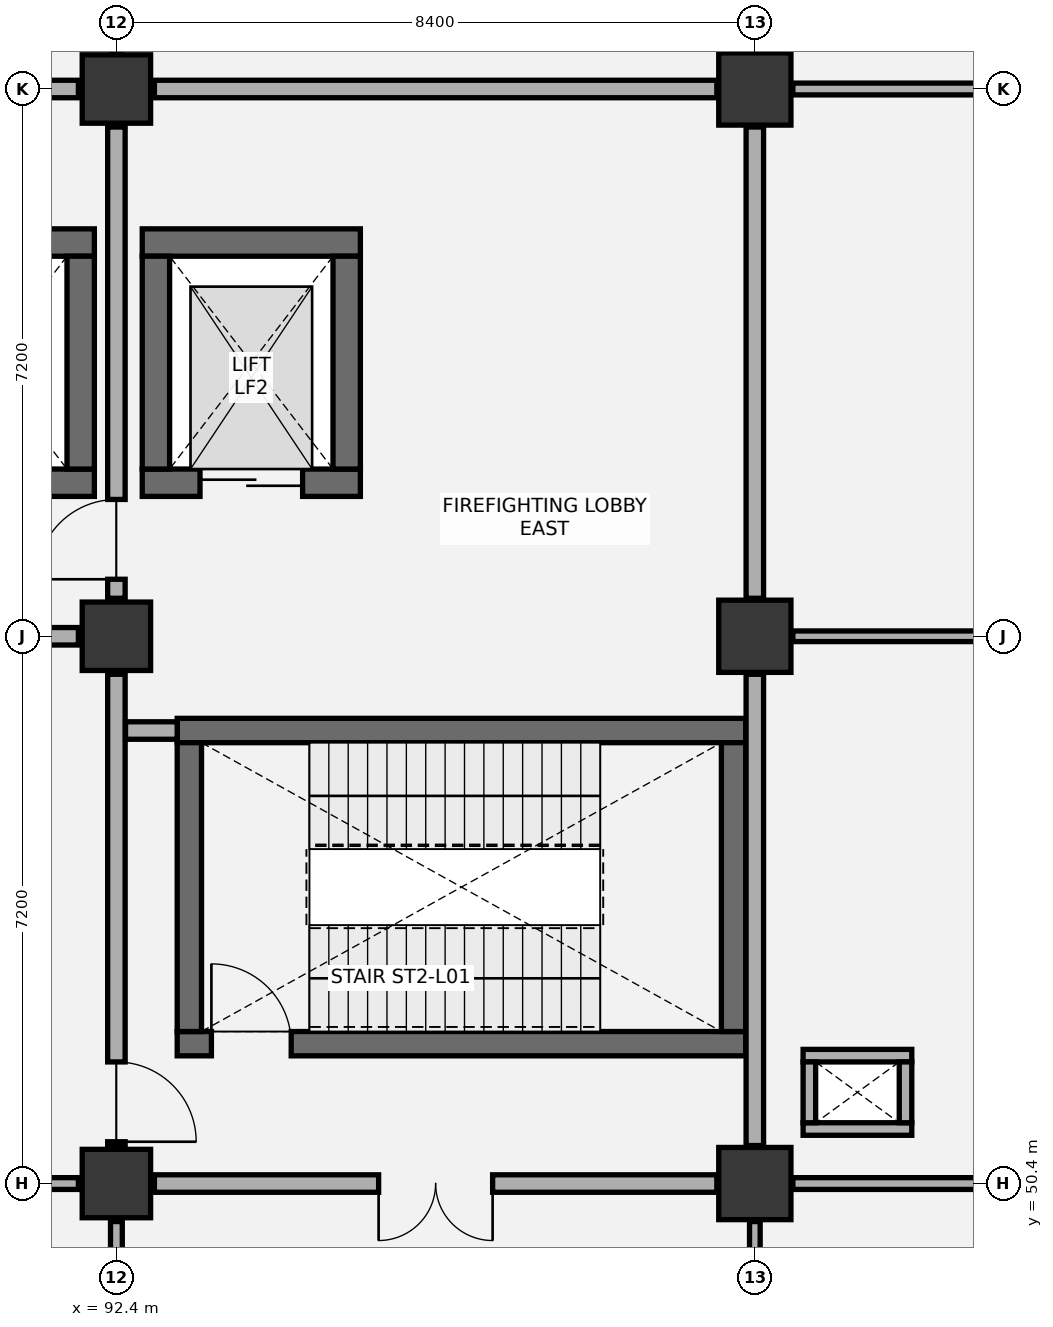
"""IFC4 building model, lengths in metres.
Left out: names, types, materials, properties, quantities, classifications, styles, units other than length and angle.
Written with IfcOpenShell. Run it as: python <this file> out.ifc"""

import sys

from ifc_helpers import new_model, si_unit, direction, frame, frame_2d, origin, origin_2d, place, context, subcontext, project, spatial, rectangle, extrude, element, fill, save


model = new_model("IFC4")
c1 = context("Model", 3, precision=1e-05, world=origin(), true_north=direction((0.0, 1.0)))
c2 = subcontext(c1, "Body", "Model", "MODEL_VIEW")
j1 = project(units=[si_unit("LENGTHUNIT", "METRE"), si_unit("PLANEANGLEUNIT", "RADIAN")], contexts=[c1])
p1 = place(None, origin())
s1 = spatial("IfcSite", under=j1, at=p1, CompositionType="ELEMENT")
p2 = place(p1, origin())
s2 = spatial("IfcBuilding", under=s1, at=p2, CompositionType="ELEMENT")
p3 = place(p2, frame((0.0, 0.0, 6.0)))
s3 = spatial("IfcBuildingStorey", under=s2, at=p3, CompositionType="ELEMENT", Elevation=6.0)
for number, where, z_axis, x_axis in (
    (1, (92.4, 50.4, 0.0), (0.0, 0.0, 1.0), (1.0, 0.0, 0.0)),
    (2, (92.4, 57.6, 0.0), (0.0, 0.0, 1.0), (1.0, 0.0, 0.0)),
    (3, (92.4, 64.8, 0.0), (0.0, 0.0, 1.0), (1.0, 0.0, 0.0)),
):
    element("IfcColumn", number, at=place(p3, frame(where, z_axis=z_axis, x_axis=x_axis)), inside=s3, PredefinedType="COLUMN", context=c2, shape_type="SweptSolid", body=[
        extrude(rectangle(XDim=0.9, YDim=0.9, at=origin_2d()), origin(), (0.0, 0.0, 1.0), 5.4),
    ])
for number, where, z_axis, x_axis in (
    (4, (100.8, 50.4, 0.0), (0.0, 0.0, 1.0), (1.0, 0.0, 0.0)),
    (5, (100.8, 57.6, 0.0), (0.0, 0.0, 1.0), (1.0, 0.0, 0.0)),
    (6, (100.8, 64.8, 0.0), (0.0, 0.0, 1.0), (1.0, 0.0, 0.0)),
):
    element("IfcColumn", number, at=place(p3, frame(where, z_axis=z_axis, x_axis=x_axis)), inside=s3, PredefinedType="COLUMN", context=c2, shape_type="SweptSolid", body=[
        extrude(rectangle(XDim=0.95, YDim=0.95, at=origin_2d()), origin(), (0.0, 0.0, 1.0), 5.4),
    ])
p4 = place(p3, frame((93.2, 52.24, 0.0), z_axis=(0.0, 0.0, 1.0), x_axis=(1.0, 0.0, 0.0)))
e7 = element("IfcWall", 7, at=p4, inside=s3, PredefinedType="SHEAR", context=c2, shape_type="SweptSolid", body=[
    extrude(rectangle(XDim=7.48, YDim=0.32, at=frame_2d((3.74, 0.0))), origin(), (0.0, 0.0, 1.0), 5.075),
])
p5 = place(p4, frame((0.45, 0.0, 0.0)))
e8 = element("IfcOpeningElement", 8, at=p5, cuts=e7, PredefinedType="OPENING", context=c2, shape_type="SweptSolid", body=[
    extrude(rectangle(XDim=1.05, YDim=2.15, at=frame_2d((0.525, 1.075))), frame((0.0, 0.17, 0.0), z_axis=(0.0, -1.0, 0.0), x_axis=(1.0, 0.0, 0.0)), (0.0, 0.0, 1.0), 0.34),
])
p6 = place(p3, frame((93.2, 56.36, 0.0), z_axis=(0.0, 0.0, 1.0), x_axis=(1.0, 0.0, 0.0)))
e9 = element("IfcWall", 9, at=p6, inside=s3, PredefinedType="SHEAR", context=c2, shape_type="SweptSolid", body=[
    extrude(rectangle(XDim=7.48, YDim=0.32, at=frame_2d((3.74, 0.0))), origin(), (0.0, 0.0, 1.0), 5.075),
])
for number, where, z_axis, x_axis in (
    (10, (93.36, 52.4, 0.0), (0.0, 0.0, 1.0), (0.0, 1.0, 0.0)),
    (11, (100.52, 52.4, 0.0), (0.0, 0.0, 1.0), (0.0, 1.0, 0.0)),
):
    element("IfcWall", number, at=place(p3, frame(where, z_axis=z_axis, x_axis=x_axis)), inside=s3, PredefinedType="SHEAR", context=c2, shape_type="SweptSolid", body=[
        extrude(rectangle(XDim=3.8, YDim=0.32, at=frame_2d((1.9, 0.0))), origin(), (0.0, 0.0, 1.0), 5.075),
    ])
p7 = place(p3, frame((84.34, 62.78, 0.0), z_axis=(0.0, 0.0, 1.0), x_axis=(1.0, 0.0, 0.0)))
e12 = element("IfcWall", 12, at=p7, inside=s3, PredefinedType="SHEAR", context=c2, shape_type="SweptSolid", body=[
    extrude(rectangle(XDim=7.77, YDim=0.36, at=frame_2d((3.885, 0.0))), origin(), (0.0, 0.0, 1.0), 5.075),
])
p8 = place(p3, frame((89.45, 59.62, 0.0), z_axis=(0.0, 0.0, 1.0), x_axis=(1.0, 0.0, 0.0)))
e13 = element("IfcWall", 13, at=p8, inside=s3, PredefinedType="SHEAR", context=c2, shape_type="SweptSolid", body=[
    extrude(rectangle(XDim=2.66, YDim=0.36, at=frame_2d((1.33, 0.0))), origin(), (0.0, 0.0, 1.0), 5.075),
])
p9 = place(p8, frame((0.78, 0.0, 0.0)))
e14 = element("IfcOpeningElement", 14, at=p9, cuts=e13, PredefinedType="OPENING", context=c2, shape_type="SweptSolid", body=[
    extrude(rectangle(XDim=1.1, YDim=2.15, at=frame_2d((0.55, 1.075))), frame((0.0, 0.19, 0.0), z_axis=(0.0, -1.0, 0.0), x_axis=(1.0, 0.0, 0.0)), (0.0, 0.0, 1.0), 0.38),
])
p10 = place(p3, frame((91.93, 59.8, 0.0), z_axis=(0.0, 0.0, 1.0), x_axis=(0.0, 1.0, 0.0)))
e15 = element("IfcWall", 15, at=p10, inside=s3, PredefinedType="SHEAR", context=c2, shape_type="SweptSolid", body=[
    extrude(rectangle(XDim=2.8, YDim=0.36, at=frame_2d((1.4, 0.0))), origin(), (0.0, 0.0, 1.0), 5.075),
])
p11 = place(p3, frame((92.74, 62.78, 0.0), z_axis=(0.0, 0.0, 1.0), x_axis=(1.0, 0.0, 0.0)))
e16 = element("IfcWall", 16, at=p11, inside=s3, PredefinedType="SHEAR", context=c2, shape_type="SweptSolid", body=[
    extrude(rectangle(XDim=2.87, YDim=0.36, at=frame_2d((1.435, 0.0))), origin(), (0.0, 0.0, 1.0), 5.075),
])
p12 = place(p3, frame((92.74, 59.62, 0.0), z_axis=(0.0, 0.0, 1.0), x_axis=(1.0, 0.0, 0.0)))
e17 = element("IfcWall", 17, at=p12, inside=s3, PredefinedType="SHEAR", context=c2, shape_type="SweptSolid", body=[
    extrude(rectangle(XDim=2.87, YDim=0.36, at=frame_2d((1.435, 0.0))), origin(), (0.0, 0.0, 1.0), 5.075),
])
p13 = place(p12, frame((0.76, 0.0, 0.0)))
e18 = element("IfcOpeningElement", 18, at=p13, cuts=e17, PredefinedType="OPENING", context=c2, shape_type="SweptSolid", body=[
    extrude(rectangle(XDim=1.35, YDim=2.2, at=frame_2d((0.675, 1.1))), frame((0.0, 0.19, 0.0), z_axis=(0.0, -1.0, 0.0), x_axis=(1.0, 0.0, 0.0)), (0.0, 0.0, 1.0), 0.38),
])
for number, where, z_axis, x_axis in (
    (19, (92.92, 59.8, 0.0), (0.0, 0.0, 1.0), (0.0, 1.0, 0.0)),
    (20, (95.43, 59.8, 0.0), (0.0, 0.0, 1.0), (0.0, 1.0, 0.0)),
):
    element("IfcWall", number, at=place(p3, frame(where, z_axis=z_axis, x_axis=x_axis)), inside=s3, PredefinedType="SHEAR", context=c2, shape_type="SweptSolid", body=[
        extrude(rectangle(XDim=2.8, YDim=0.36, at=frame_2d((1.4, 0.0))), origin(), (0.0, 0.0, 1.0), 5.075),
    ])
for number, where, z_axis, x_axis in (
    (21, (101.435, 51.117, 0.0), (0.0, 0.0, 1.0), (1.0, 0.0, 0.0)),
    (22, (101.435, 52.083, 0.0), (0.0, 0.0, 1.0), (1.0, 0.0, 0.0)),
):
    element("IfcWall", number, at=place(p3, frame(where, z_axis=z_axis, x_axis=x_axis)), inside=s3, PredefinedType="PARTITIONING", context=c2, shape_type="SweptSolid", body=[
        extrude(rectangle(XDim=1.43, YDim=0.165, at=frame_2d((0.715, 0.0))), origin(), (0.0, 0.0, 1.0), 5.075),
    ])
for number, where, z_axis, x_axis in (
    (23, (101.518, 51.2, 0.0), (0.0, 0.0, 1.0), (0.0, 1.0, 0.0)),
    (24, (102.782, 51.2, 0.0), (0.0, 0.0, 1.0), (0.0, 1.0, 0.0)),
):
    element("IfcWall", number, at=place(p3, frame(where, z_axis=z_axis, x_axis=x_axis)), inside=s3, PredefinedType="PARTITIONING", context=c2, shape_type="SweptSolid", body=[
        extrude(rectangle(XDim=0.8, YDim=0.165, at=frame_2d((0.4, 0.0))), origin(), (0.0, 0.0, 1.0), 5.075),
    ])
p14 = place(p3, frame((92.4, 43.7, 0.0), z_axis=(0.0, 0.0, 1.0), x_axis=(0.0, 1.0, 0.0)))
e25 = element("IfcWall", 25, at=p14, inside=s3, PredefinedType="PARTITIONING", context=c2, shape_type="SweptSolid", body=[
    extrude(rectangle(XDim=6.2, YDim=0.155, at=frame_2d((3.1, 0.0))), origin(), (0.0, 0.0, 1.0), 4.67),
])
p15 = place(p14, frame((2.25, 0.0, 0.0)))
e26 = element("IfcOpeningElement", 26, at=p15, cuts=e25, PredefinedType="OPENING", context=c2, shape_type="SweptSolid", body=[
    extrude(rectangle(XDim=1.7, YDim=2.25, at=frame_2d((0.85, 1.125))), frame((0.0, 0.087, 0.0), z_axis=(0.0, -1.0, 0.0), x_axis=(1.0, 0.0, 0.0)), (0.0, 0.0, 1.0), 0.175),
])
p16 = place(p3, frame((84.5, 50.4, 0.0), z_axis=(0.0, 0.0, 1.0), x_axis=(1.0, 0.0, 0.0)))
e27 = element("IfcWall", 27, at=p16, inside=s3, PredefinedType="PARTITIONING", context=c2, shape_type="SweptSolid", body=[
    extrude(rectangle(XDim=7.4, YDim=0.155, at=frame_2d((3.7, 0.0))), origin(), (0.0, 0.0, 1.0), 4.27),
])
p17 = place(p16, frame((3.0, 0.0, 0.0)))
e28 = element("IfcOpeningElement", 28, at=p17, cuts=e27, PredefinedType="OPENING", context=c2, shape_type="SweptSolid", body=[
    extrude(rectangle(XDim=1.4, YDim=2.15, at=frame_2d((0.7, 1.075))), frame((0.0, 0.087, 0.0), z_axis=(0.0, -1.0, 0.0), x_axis=(1.0, 0.0, 0.0)), (0.0, 0.0, 1.0), 0.175),
])
p18 = place(p3, frame((92.4, 50.9, 0.0), z_axis=(0.0, 0.0, 1.0), x_axis=(0.0, 1.0, 0.0)))
e29 = element("IfcWall", 29, at=p18, inside=s3, PredefinedType="PARTITIONING", context=c2, shape_type="SweptSolid", body=[
    extrude(rectangle(XDim=6.2, YDim=0.23, at=frame_2d((3.1, 0.0))), origin(), (0.0, 0.0, 1.0), 4.32),
])
p19 = place(p18, frame((0.05, 0.0, 0.0)))
e30 = element("IfcOpeningElement", 30, at=p19, cuts=e29, PredefinedType="OPENING", context=c2, shape_type="SweptSolid", body=[
    extrude(rectangle(XDim=1.05, YDim=2.15, at=frame_2d((0.525, 1.075))), frame((0.0, 0.125, 0.0), z_axis=(0.0, -1.0, 0.0), x_axis=(1.0, 0.0, 0.0)), (0.0, 0.0, 1.0), 0.25),
])
p20 = place(p3, frame((84.5, 57.6, 0.0), z_axis=(0.0, 0.0, 1.0), x_axis=(1.0, 0.0, 0.0)))
e31 = element("IfcWall", 31, at=p20, inside=s3, PredefinedType="PARTITIONING", context=c2, shape_type="SweptSolid", body=[
    extrude(rectangle(XDim=7.4, YDim=0.23, at=frame_2d((3.7, 0.0))), origin(), (0.0, 0.0, 1.0), 4.27),
])
p21 = place(p20, frame((2.95, 0.0, 0.0)))
e32 = element("IfcOpeningElement", 32, at=p21, cuts=e31, PredefinedType="OPENING", context=c2, shape_type="SweptSolid", body=[
    extrude(rectangle(XDim=1.5, YDim=2.15, at=frame_2d((0.75, 1.075))), frame((0.0, 0.125, 0.0), z_axis=(0.0, -1.0, 0.0), x_axis=(1.0, 0.0, 0.0)), (0.0, 0.0, 1.0), 0.25),
])
p22 = place(p3, frame((92.4, 58.1, 0.0), z_axis=(0.0, 0.0, 1.0), x_axis=(0.0, 1.0, 0.0)))
e33 = element("IfcWall", 33, at=p22, inside=s3, PredefinedType="PARTITIONING", context=c2, shape_type="SweptSolid", body=[
    extrude(rectangle(XDim=6.2, YDim=0.23, at=frame_2d((3.1, 0.0))), origin(), (0.0, 0.0, 1.0), 4.78),
])
p23 = place(p22, frame((0.25, 0.0, 0.0)))
e34 = element("IfcOpeningElement", 34, at=p23, cuts=e33, PredefinedType="OPENING", context=c2, shape_type="SweptSolid", body=[
    extrude(rectangle(XDim=1.05, YDim=2.15, at=frame_2d((0.525, 1.075))), frame((0.0, 0.125, 0.0), z_axis=(0.0, -1.0, 0.0), x_axis=(1.0, 0.0, 0.0)), (0.0, 0.0, 1.0), 0.25),
])
p24 = place(p3, frame((84.5, 64.8, 0.0), z_axis=(0.0, 0.0, 1.0), x_axis=(1.0, 0.0, 0.0)))
e35 = element("IfcWall", 35, at=p24, inside=s3, PredefinedType="PARTITIONING", context=c2, shape_type="SweptSolid", body=[
    extrude(rectangle(XDim=7.4, YDim=0.23, at=frame_2d((3.7, 0.0))), origin(), (0.0, 0.0, 1.0), 4.27),
])
p25 = place(p3, frame((100.8, 43.7, 0.0), z_axis=(0.0, 0.0, 1.0), x_axis=(0.0, 1.0, 0.0)))
e36 = element("IfcWall", 36, at=p25, inside=s3, PredefinedType="PARTITIONING", context=c2, shape_type="SweptSolid", body=[
    extrude(rectangle(XDim=6.2, YDim=0.14, at=frame_2d((3.1, 0.0))), origin(), (0.0, 0.0, 1.0), 4.32),
])
p26 = place(p25, frame((2.4, 0.0, 0.0)))
e37 = element("IfcOpeningElement", 37, at=p26, cuts=e36, PredefinedType="OPENING", context=c2, shape_type="SweptSolid", body=[
    extrude(rectangle(XDim=1.4, YDim=2.15, at=frame_2d((0.7, 1.075))), frame((0.0, 0.08, 0.0), z_axis=(0.0, -1.0, 0.0), x_axis=(1.0, 0.0, 0.0)), (0.0, 0.0, 1.0), 0.16),
])
p27 = place(p3, frame((92.9, 50.4, 0.0), z_axis=(0.0, 0.0, 1.0), x_axis=(1.0, 0.0, 0.0)))
e38 = element("IfcWall", 38, at=p27, inside=s3, PredefinedType="PARTITIONING", context=c2, shape_type="SweptSolid", body=[
    extrude(rectangle(XDim=7.4, YDim=0.23, at=frame_2d((3.7, 0.0))), origin(), (0.0, 0.0, 1.0), 4.27),
])
p28 = place(p27, frame((2.95, 0.0, 0.0)))
e39 = element("IfcOpeningElement", 39, at=p28, cuts=e38, PredefinedType="OPENING", context=c2, shape_type="SweptSolid", body=[
    extrude(rectangle(XDim=1.5, YDim=2.15, at=frame_2d((0.75, 1.075))), frame((0.0, 0.125, 0.0), z_axis=(0.0, -1.0, 0.0), x_axis=(1.0, 0.0, 0.0)), (0.0, 0.0, 1.0), 0.25),
])
p29 = place(p3, frame((100.8, 50.9, 0.0), z_axis=(0.0, 0.0, 1.0), x_axis=(0.0, 1.0, 0.0)))
e40 = element("IfcWall", 40, at=p29, inside=s3, PredefinedType="PARTITIONING", context=c2, shape_type="SweptSolid", body=[
    extrude(rectangle(XDim=6.2, YDim=0.23, at=frame_2d((3.1, 0.0))), origin(), (0.0, 0.0, 1.0), 4.78),
])
p30 = place(p3, frame((92.52, 56.36, 0.0), z_axis=(0.0, 0.0, 1.0), x_axis=(1.0, 0.0, 0.0)))
e41 = element("IfcWall", 41, at=p30, inside=s3, PredefinedType="PARTITIONING", context=c2, shape_type="SweptSolid", body=[
    extrude(rectangle(XDim=0.68, YDim=0.23, at=frame_2d((0.34, 0.0))), origin(), (0.0, 0.0, 1.0), 5.075),
])
p31 = place(p3, frame((100.8, 58.1, 0.0), z_axis=(0.0, 0.0, 1.0), x_axis=(0.0, 1.0, 0.0)))
e42 = element("IfcWall", 42, at=p31, inside=s3, PredefinedType="PARTITIONING", context=c2, shape_type="SweptSolid", body=[
    extrude(rectangle(XDim=6.2, YDim=0.23, at=frame_2d((3.1, 0.0))), origin(), (0.0, 0.0, 1.0), 4.32),
])
p32 = place(p3, frame((92.9, 64.8, 0.0), z_axis=(0.0, 0.0, 1.0), x_axis=(1.0, 0.0, 0.0)))
e43 = element("IfcWall", 43, at=p32, inside=s3, PredefinedType="PARTITIONING", context=c2, shape_type="SweptSolid", body=[
    extrude(rectangle(XDim=7.4, YDim=0.23, at=frame_2d((3.7, 0.0))), origin(), (0.0, 0.0, 1.0), 4.27),
])
p33 = place(p3, frame((101.3, 50.4, 0.0), z_axis=(0.0, 0.0, 1.0), x_axis=(1.0, 0.0, 0.0)))
e44 = element("IfcWall", 44, at=p33, inside=s3, PredefinedType="PARTITIONING", context=c2, shape_type="SweptSolid", body=[
    extrude(rectangle(XDim=7.4, YDim=0.155, at=frame_2d((3.7, 0.0))), origin(), (0.0, 0.0, 1.0), 4.27),
])
p34 = place(p33, frame((3.0, 0.0, 0.0)))
e45 = element("IfcOpeningElement", 45, at=p34, cuts=e44, PredefinedType="OPENING", context=c2, shape_type="SweptSolid", body=[
    extrude(rectangle(XDim=1.4, YDim=2.15, at=frame_2d((0.7, 1.075))), frame((0.0, 0.087, 0.0), z_axis=(0.0, -1.0, 0.0), x_axis=(1.0, 0.0, 0.0)), (0.0, 0.0, 1.0), 0.175),
])
p35 = place(p3, frame((101.3, 57.6, 0.0), z_axis=(0.0, 0.0, 1.0), x_axis=(1.0, 0.0, 0.0)))
e46 = element("IfcWall", 46, at=p35, inside=s3, PredefinedType="PARTITIONING", context=c2, shape_type="SweptSolid", body=[
    extrude(rectangle(XDim=7.4, YDim=0.14, at=frame_2d((3.7, 0.0))), origin(), (0.0, 0.0, 1.0), 4.27),
])
p36 = place(p35, frame((2.85, 0.0, 0.0)))
e47 = element("IfcOpeningElement", 47, at=p36, cuts=e46, PredefinedType="OPENING", context=c2, shape_type="SweptSolid", body=[
    extrude(rectangle(XDim=1.7, YDim=2.25, at=frame_2d((0.85, 1.125))), frame((0.0, 0.08, 0.0), z_axis=(0.0, -1.0, 0.0), x_axis=(1.0, 0.0, 0.0)), (0.0, 0.0, 1.0), 0.16),
])
p37 = place(p3, frame((101.3, 64.8, 0.0), z_axis=(0.0, 0.0, 1.0), x_axis=(1.0, 0.0, 0.0)))
e48 = element("IfcWall", 48, at=p37, inside=s3, PredefinedType="PARTITIONING", context=c2, shape_type="SweptSolid", body=[
    extrude(rectangle(XDim=7.4, YDim=0.155, at=frame_2d((3.7, 0.0))), origin(), (0.0, 0.0, 1.0), 4.27),
])
p38 = place(p37, frame((2.85, 0.0, 0.0)))
e49 = element("IfcOpeningElement", 49, at=p38, cuts=e48, PredefinedType="OPENING", context=c2, shape_type="SweptSolid", body=[
    extrude(rectangle(XDim=1.7, YDim=2.25, at=frame_2d((0.85, 1.125))), frame((0.0, 0.087, 0.0), z_axis=(0.0, -1.0, 0.0), x_axis=(1.0, 0.0, 0.0)), (0.0, 0.0, 1.0), 0.175),
])
p39 = place(p5, origin())
e50 = element("IfcDoor", 50, at=p39, inside=s3, OperationType="SINGLE_SWING_LEFT", PredefinedType="DOOR", context=c2, shape_type="SweptSolid", body=[
    extrude(rectangle(XDim=1.05, YDim=2.15, at=frame_2d((0.525, 1.075))), frame((0.0, 0.025, 0.0), z_axis=(0.0, -1.0, 0.0), x_axis=(1.0, 0.0, 0.0)), (0.0, 0.0, 1.0), 0.05),
])
fill(e8, e50)
p40 = place(p13, origin())
e51 = element("IfcDoor", 51, at=p40, inside=s3, OperationType="DOUBLE_DOOR_SLIDING", PredefinedType="DOOR", context=c2, shape_type="SweptSolid", body=[
    extrude(rectangle(XDim=1.35, YDim=2.2, at=frame_2d((0.675, 1.1))), frame((0.0, 0.025, 0.0), z_axis=(0.0, -1.0, 0.0), x_axis=(1.0, 0.0, 0.0)), (0.0, 0.0, 1.0), 0.05),
])
fill(e18, e51)
p41 = place(p19, frame((1.05, 0.0, 0.0), z_axis=(0.0, 0.0, 1.0), x_axis=(-1.0, 0.0, 0.0)))
e52 = element("IfcDoor", 52, at=p41, inside=s3, OperationType="SINGLE_SWING_RIGHT", PredefinedType="DOOR", context=c2, shape_type="SweptSolid", body=[
    extrude(rectangle(XDim=1.05, YDim=2.15, at=frame_2d((0.525, 1.075))), frame((0.0, 0.025, 0.0), z_axis=(0.0, -1.0, 0.0), x_axis=(1.0, 0.0, 0.0)), (0.0, 0.0, 1.0), 0.05),
])
fill(e30, e52)
p42 = place(p23, origin())
e53 = element("IfcDoor", 53, at=p42, inside=s3, OperationType="SINGLE_SWING_LEFT", PredefinedType="DOOR", context=c2, shape_type="SweptSolid", body=[
    extrude(rectangle(XDim=1.05, YDim=2.15, at=frame_2d((0.525, 1.075))), frame((0.0, 0.025, 0.0), z_axis=(0.0, -1.0, 0.0), x_axis=(1.0, 0.0, 0.0)), (0.0, 0.0, 1.0), 0.05),
])
fill(e34, e53)
p43 = place(p28, frame((1.5, 0.0, 0.0), z_axis=(0.0, 0.0, 1.0), x_axis=(-1.0, 0.0, 0.0)))
e54 = element("IfcDoor", 54, at=p43, inside=s3, OperationType="DOUBLE_DOOR_SINGLE_SWING", PredefinedType="DOOR", context=c2, shape_type="SweptSolid", body=[
    extrude(rectangle(XDim=1.5, YDim=2.15, at=frame_2d((0.75, 1.075))), frame((0.0, 0.025, 0.0), z_axis=(0.0, -1.0, 0.0), x_axis=(1.0, 0.0, 0.0)), (0.0, 0.0, 1.0), 0.05),
])
fill(e39, e54)
save(model, sys.argv[1])
